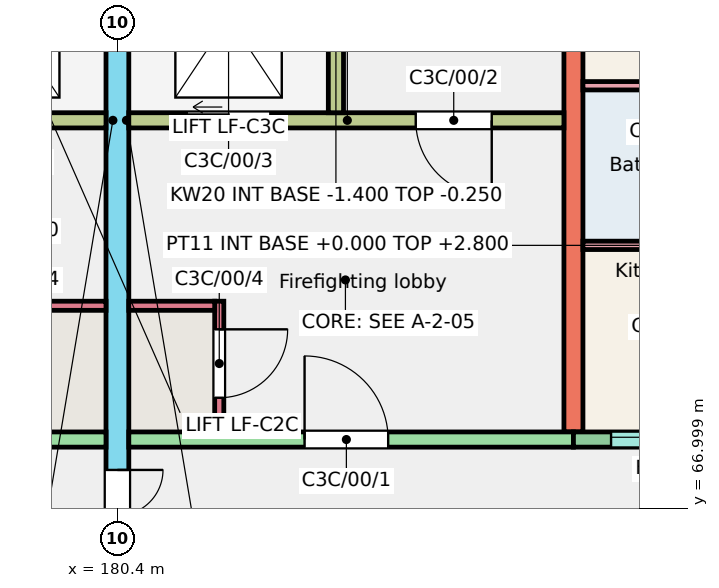
"""IFC4 building model, lengths in metres.
Left out: names, types, materials, properties, quantities, classifications, styles, units other than length and angle.
Written with IfcOpenShell. Run it as: python <this file> out.ifc"""

import sys

from ifc_helpers import new_model, si_unit, direction, frame, frame_2d, origin, place, context, subcontext, project, spatial, rectangle, extrude, element, fill, save


model = new_model("IFC4")
c1 = context("Model", 3, precision=1e-05, world=origin(), true_north=direction((0.0, 1.0)))
c2 = subcontext(c1, "Body", "Model", "MODEL_VIEW")
j1 = project(units=[si_unit("LENGTHUNIT", "METRE"), si_unit("PLANEANGLEUNIT", "RADIAN")], contexts=[c1])
p1 = place(None, origin())
s1 = spatial("IfcSite", under=j1, at=p1, CompositionType="ELEMENT")
p2 = place(p1, origin())
s2 = spatial("IfcBuilding", under=s1, at=p2, CompositionType="ELEMENT")
p3 = place(p2, origin())
s3 = spatial("IfcBuildingStorey", under=s2, at=p3, CompositionType="ELEMENT", Elevation=0.0)
p4 = place(p3, frame((180.4, 66.0, -0.25), z_axis=(0.0, 0.0, 1.0), x_axis=(0.0, 1.0, 0.0)))
e1 = element("IfcWall", 1, at=p4, inside=s3, PredefinedType="SHEAR", context=c2, shape_type="SweptSolid", body=[
    extrude(rectangle(XDim=11.0, YDim=0.3, at=frame_2d((5.5, 0.0))), origin(), (0.0, 0.0, 1.0), 3.25),
])
p5 = place(p4, frame((0.3, 0.0, 0.25)))
e2 = element("IfcOpeningElement", 2, at=p5, cuts=e1, PredefinedType="OPENING", context=c2, shape_type="SweptSolid", body=[
    extrude(rectangle(XDim=1.2, YDim=2.1, at=frame_2d((0.6, 1.05))), frame((0.0, 0.16, 0.0), z_axis=(0.0, -1.0, 0.0), x_axis=(1.0, 0.0, 0.0)), (0.0, 0.0, 1.0), 0.32),
])
p6 = place(p3, frame((186.4, 68.0, -0.25), z_axis=(0.0, 0.0, 1.0), x_axis=(0.0, 1.0, 0.0)))
e3 = element("IfcWall", 3, at=p6, inside=s3, PredefinedType="SHEAR", context=c2, shape_type="SweptSolid", body=[
    extrude(rectangle(XDim=9.0, YDim=0.25, at=frame_2d((4.5, 0.0))), origin(), (0.0, 0.0, 1.0), 3.25),
])
p7 = place(p3, frame((174.4, 67.9, -0.25), z_axis=(0.0, 0.0, 1.0), x_axis=(1.0, 0.0, 0.0)))
e4 = element("IfcWall", 4, at=p7, inside=s3, PredefinedType="SHEAR", context=c2, shape_type="SweptSolid", body=[
    extrude(rectangle(XDim=5.85, YDim=0.2, at=frame_2d((2.925, 0.0))), origin(), (0.0, 0.0, 1.0), 3.25),
])
p8 = place(p7, frame((2.438, 0.0, 0.25)))
e5 = element("IfcOpeningElement", 5, at=p8, cuts=e4, PredefinedType="OPENING", context=c2, shape_type="SweptSolid", body=[
    extrude(rectangle(XDim=1.1, YDim=2.1, at=frame_2d((0.55, 1.05))), frame((0.0, 0.11, 0.0), z_axis=(0.0, -1.0, 0.0), x_axis=(1.0, 0.0, 0.0)), (0.0, 0.0, 1.0), 0.22),
])
p9 = place(p3, frame((174.525, 72.1, -0.25), z_axis=(0.0, 0.0, 1.0), x_axis=(1.0, 0.0, 0.0)))
e6 = element("IfcWall", 6, at=p9, inside=s3, PredefinedType="SHEAR", context=c2, shape_type="SweptSolid", body=[
    extrude(rectangle(XDim=5.725, YDim=0.2, at=frame_2d((2.863, 0.0))), origin(), (0.0, 0.0, 1.0), 3.25),
])
p10 = place(p9, frame((0.95, 0.0, 0.25)))
e7 = element("IfcOpeningElement", 7, at=p10, cuts=e6, PredefinedType="OPENING", context=c2, shape_type="SweptSolid", body=[
    extrude(rectangle(XDim=1.0, YDim=2.1, at=frame_2d((0.5, 1.05))), frame((0.0, 0.11, 0.0), z_axis=(0.0, -1.0, 0.0), x_axis=(1.0, 0.0, 0.0)), (0.0, 0.0, 1.0), 0.22),
])
p11 = place(p9, frame((3.863, 0.0, 0.25)))
e8 = element("IfcOpeningElement", 8, at=p11, cuts=e6, PredefinedType="OPENING", context=c2, shape_type="SweptSolid", body=[
    extrude(rectangle(XDim=1.1, YDim=2.1, at=frame_2d((0.55, 1.05))), frame((0.0, 0.11, 0.0), z_axis=(0.0, -1.0, 0.0), x_axis=(1.0, 0.0, 0.0)), (0.0, 0.0, 1.0), 0.22),
])
p12 = place(p3, frame((179.12, 69.66, -0.25), z_axis=(0.0, 0.0, 1.0), x_axis=(1.0, 0.0, 0.0)))
e9 = element("IfcWall", 9, at=p12, inside=s3, PredefinedType="SHEAR", context=c2, shape_type="SweptSolid", body=[
    extrude(rectangle(XDim=1.13, YDim=0.12, at=frame_2d((0.565, 0.0))), origin(), (0.0, 0.0, 1.0), 3.25),
])
p13 = place(p3, frame((180.55, 67.9, -0.25), z_axis=(0.0, 0.0, 1.0), x_axis=(1.0, 0.0, 0.0)))
e10 = element("IfcWall", 10, at=p13, inside=s3, PredefinedType="SHEAR", context=c2, shape_type="SweptSolid", body=[
    extrude(rectangle(XDim=5.85, YDim=0.2, at=frame_2d((2.925, 0.0))), origin(), (0.0, 0.0, 1.0), 3.25),
])
p14 = place(p13, frame((2.312, 0.0, 0.25)))
e11 = element("IfcOpeningElement", 11, at=p14, cuts=e10, PredefinedType="OPENING", context=c2, shape_type="SweptSolid", body=[
    extrude(rectangle(XDim=1.1, YDim=2.1, at=frame_2d((0.55, 1.05))), frame((0.0, 0.11, 0.0), z_axis=(0.0, -1.0, 0.0), x_axis=(1.0, 0.0, 0.0)), (0.0, 0.0, 1.0), 0.22),
])
p15 = place(p3, frame((180.55, 72.1, -0.25), z_axis=(0.0, 0.0, 1.0), x_axis=(1.0, 0.0, 0.0)))
e12 = element("IfcWall", 12, at=p15, inside=s3, PredefinedType="SHEAR", context=c2, shape_type="SweptSolid", body=[
    extrude(rectangle(XDim=5.725, YDim=0.2, at=frame_2d((2.862, 0.0))), origin(), (0.0, 0.0, 1.0), 3.25),
])
p16 = place(p15, frame((3.775, 0.0, 0.25)))
e13 = element("IfcOpeningElement", 13, at=p16, cuts=e12, PredefinedType="OPENING", context=c2, shape_type="SweptSolid", body=[
    extrude(rectangle(XDim=1.0, YDim=2.1, at=frame_2d((0.5, 1.05))), frame((0.0, 0.11, 0.0), z_axis=(0.0, -1.0, 0.0), x_axis=(1.0, 0.0, 0.0)), (0.0, 0.0, 1.0), 0.22),
])
p17 = place(p15, frame((0.762, 0.0, 0.25)))
e14 = element("IfcOpeningElement", 14, at=p17, cuts=e12, PredefinedType="OPENING", context=c2, shape_type="SweptSolid", body=[
    extrude(rectangle(XDim=1.1, YDim=2.1, at=frame_2d((0.55, 1.05))), frame((0.0, 0.11, 0.0), z_axis=(0.0, -1.0, 0.0), x_axis=(1.0, 0.0, 0.0)), (0.0, 0.0, 1.0), 0.22),
])
p18 = place(p3, frame((183.275, 72.2, -0.25), z_axis=(0.0, 0.0, 1.0), x_axis=(0.0, 1.0, 0.0)))
e15 = element("IfcWall", 15, at=p18, inside=s3, PredefinedType="SHEAR", context=c2, shape_type="SweptSolid", body=[
    extrude(rectangle(XDim=4.8, YDim=0.2, at=frame_2d((2.4, 0.0))), origin(), (0.0, 0.0, 1.0), 3.25),
])
p19 = place(p3, frame((181.74, 68.0, -0.25), z_axis=(0.0, 0.0, 1.0), x_axis=(0.0, 1.0, 0.0)))
e16 = element("IfcWall", 16, at=p19, inside=s3, PredefinedType="SHEAR", context=c2, shape_type="SweptSolid", body=[
    extrude(rectangle(XDim=1.72, YDim=0.12, at=frame_2d((0.86, 0.0))), origin(), (0.0, 0.0, 1.0), 3.25),
])
p20 = place(p19, frame((0.45, 0.0, 0.25)))
e17 = element("IfcOpeningElement", 17, at=p20, cuts=e16, PredefinedType="OPENING", context=c2, shape_type="SweptSolid", body=[
    extrude(rectangle(XDim=0.9, YDim=2.1, at=frame_2d((0.45, 1.05))), frame((0.0, 0.07, 0.0), z_axis=(0.0, -1.0, 0.0), x_axis=(1.0, 0.0, 0.0)), (0.0, 0.0, 1.0), 0.14),
])
p21 = place(p3, frame((180.55, 69.66, -0.25), z_axis=(0.0, 0.0, 1.0), x_axis=(1.0, 0.0, 0.0)))
e18 = element("IfcWall", 18, at=p21, inside=s3, PredefinedType="SHEAR", context=c2, shape_type="SweptSolid", body=[
    extrude(rectangle(XDim=1.13, YDim=0.12, at=frame_2d((0.565, 0.0))), origin(), (0.0, 0.0, 1.0), 3.25),
])
p22 = place(p3, frame((186.4, 67.9, -0.25), z_axis=(0.0, 0.0, 1.0), x_axis=(1.0, 0.0, 0.0)))
e19 = element("IfcWall", 19, at=p22, inside=s3, PredefinedType="SOLIDWALL", context=c2, shape_type="SweptSolid", body=[
    extrude(rectangle(XDim=3.6, YDim=0.2, at=frame_2d((1.8, 0.0))), origin(), (0.0, 0.0, 1.0), 3.25),
])
p23 = place(p22, frame((0.495, 0.0, 1.35)))
e20 = element("IfcOpeningElement", 20, at=p23, cuts=e19, PredefinedType="OPENING", context=c2, shape_type="SweptSolid", body=[
    extrude(rectangle(XDim=1.2, YDim=1.3, at=frame_2d((0.6, 0.65))), frame((0.0, 0.11, 0.0), z_axis=(0.0, -1.0, 0.0), x_axis=(1.0, 0.0, 0.0)), (0.0, 0.0, 1.0), 0.22),
])
p24 = place(p22, frame((2.325, 0.0, 0.25)))
e21 = element("IfcOpeningElement", 21, at=p24, cuts=e19, PredefinedType="OPENING", context=c2, shape_type="SweptSolid", body=[
    extrude(rectangle(XDim=1.0, YDim=2.1, at=frame_2d((0.5, 1.05))), frame((0.0, 0.11, 0.0), z_axis=(0.0, -1.0, 0.0), x_axis=(1.0, 0.0, 0.0)), (0.0, 0.0, 1.0), 0.22),
])
p25 = place(p3, frame((177.425, 72.1, -1.4), z_axis=(0.0, 0.0, 1.0), x_axis=(1.0, 0.0, 0.0)))
e22 = element("IfcWall", 22, at=p25, inside=s3, PredefinedType="SHEAR", context=c2, shape_type="SweptSolid", body=[
    extrude(rectangle(XDim=2.975, YDim=0.2, at=frame_2d((1.487, 0.0))), origin(), (0.0, 0.0, 1.0), 1.15),
])
p26 = place(p3, frame((180.325, 72.2, -1.4), z_axis=(0.0, 0.0, 1.0), x_axis=(0.0, 1.0, 0.0)))
e23 = element("IfcWall", 23, at=p26, inside=s3, PredefinedType="SHEAR", context=c2, shape_type="SweptSolid", body=[
    extrude(rectangle(XDim=3.0, YDim=0.15, at=frame_2d((1.5, 0.0))), origin(), (0.0, 0.0, 1.0), 1.15),
])
p27 = place(p3, frame((180.4, 72.1, -1.4), z_axis=(0.0, 0.0, 1.0), x_axis=(1.0, 0.0, 0.0)))
e24 = element("IfcWall", 24, at=p27, inside=s3, PredefinedType="SHEAR", context=c2, shape_type="SweptSolid", body=[
    extrude(rectangle(XDim=2.975, YDim=0.2, at=frame_2d((1.488, 0.0))), origin(), (0.0, 0.0, 1.0), 1.15),
])
p28 = place(p3, frame((183.275, 72.2, -1.4), z_axis=(0.0, 0.0, 1.0), x_axis=(0.0, 1.0, 0.0)))
e25 = element("IfcWall", 25, at=p28, inside=s3, PredefinedType="SHEAR", context=c2, shape_type="SweptSolid", body=[
    extrude(rectangle(XDim=3.0, YDim=0.2, at=frame_2d((1.5, 0.0))), origin(), (0.0, 0.0, 1.0), 1.15),
])
p29 = place(p3, frame((180.475, 72.2, -1.4), z_axis=(0.0, 0.0, 1.0), x_axis=(0.0, 1.0, 0.0)))
e26 = element("IfcWall", 26, at=p29, inside=s3, PredefinedType="SHEAR", context=c2, shape_type="SweptSolid", body=[
    extrude(rectangle(XDim=3.0, YDim=0.15, at=frame_2d((1.5, 0.0))), origin(), (0.0, 0.0, 1.0), 1.15),
])
p30 = place(p3, frame((186.525, 70.455, 0.0), z_axis=(0.0, 0.0, 1.0), x_axis=(1.0, 0.0, 0.0)))
e27 = element("IfcWall", 27, at=p30, inside=s3, PredefinedType="PARTITIONING", context=c2, shape_type="SweptSolid", body=[
    extrude(rectangle(XDim=1.94, YDim=0.11, at=frame_2d((0.97, 0.0))), origin(), (0.0, 0.0, 1.0), 2.8),
])
p31 = place(p3, frame((186.525, 72.555, 0.0), z_axis=(0.0, 0.0, 1.0), x_axis=(1.0, 0.0, 0.0)))
e28 = element("IfcWall", 28, at=p31, inside=s3, PredefinedType="PARTITIONING", context=c2, shape_type="SweptSolid", body=[
    extrude(rectangle(XDim=3.35, YDim=0.11, at=frame_2d((1.675, 0.0))), origin(), (0.0, 0.0, 1.0), 2.8),
])
p32 = place(p31, frame((2.25, 0.0, 0.0)))
e29 = element("IfcOpeningElement", 29, at=p32, cuts=e28, PredefinedType="OPENING", context=c2, shape_type="SweptSolid", body=[
    extrude(rectangle(XDim=0.9, YDim=2.1, at=frame_2d((0.45, 1.05))), frame((0.0, 0.065, 0.0), z_axis=(0.0, -1.0, 0.0), x_axis=(1.0, 0.0, 0.0)), (0.0, 0.0, 1.0), 0.13),
])
p33 = place(p23, origin())
e30 = element("IfcWindow", 30, at=p33, inside=s3, PartitioningType="SINGLE_PANEL", PredefinedType="WINDOW", context=c2, shape_type="SweptSolid", body=[
    extrude(rectangle(XDim=1.2, YDim=1.3, at=frame_2d((0.6, 0.65))), frame((0.0, 0.06, 0.0), z_axis=(0.0, -1.0, 0.0), x_axis=(1.0, 0.0, 0.0)), (0.0, 0.0, 1.0), 0.06),
])
fill(e20, e30)
p34 = place(p14, origin())
e31 = element("IfcDoor", 31, at=p34, inside=s3, OperationType="SINGLE_SWING_LEFT", PredefinedType="DOOR", context=c2, shape_type="SweptSolid", body=[
    extrude(rectangle(XDim=1.1, YDim=2.1, at=frame_2d((0.55, 1.05))), frame((0.0, 0.025, 0.0), z_axis=(0.0, -1.0, 0.0), x_axis=(1.0, 0.0, 0.0)), (0.0, 0.0, 1.0), 0.05),
])
fill(e11, e31)
p35 = place(p16, origin())
e32 = element("IfcDoor", 32, at=p35, inside=s3, OperationType="SINGLE_SWING_RIGHT", PredefinedType="DOOR", context=c2, shape_type="SweptSolid", body=[
    extrude(rectangle(XDim=1.0, YDim=2.1, at=frame_2d((0.5, 1.05))), frame((0.0, 0.025, 0.0), z_axis=(0.0, -1.0, 0.0), x_axis=(1.0, 0.0, 0.0)), (0.0, 0.0, 1.0), 0.05),
])
fill(e13, e32)
p36 = place(p17, origin())
e33 = element("IfcDoor", 33, at=p36, inside=s3, OperationType="DOUBLE_DOOR_SLIDING", PredefinedType="DOOR", context=c2, shape_type="SweptSolid", body=[
    extrude(rectangle(XDim=1.1, YDim=2.1, at=frame_2d((0.55, 1.05))), frame((0.0, 0.025, 0.0), z_axis=(0.0, -1.0, 0.0), x_axis=(1.0, 0.0, 0.0)), (0.0, 0.0, 1.0), 0.05),
])
fill(e14, e33)
p37 = place(p20, origin())
e34 = element("IfcDoor", 34, at=p37, inside=s3, OperationType="SINGLE_SWING_RIGHT", PredefinedType="DOOR", context=c2, shape_type="SweptSolid", body=[
    extrude(rectangle(XDim=0.9, YDim=2.1, at=frame_2d((0.45, 1.05))), frame((0.0, 0.025, 0.0), z_axis=(0.0, -1.0, 0.0), x_axis=(1.0, 0.0, 0.0)), (0.0, 0.0, 1.0), 0.05),
])
fill(e17, e34)
p38 = place(p5, origin())
e35 = element("IfcDoor", 35, at=p38, inside=s3, OperationType="DOUBLE_DOOR_SINGLE_SWING", PredefinedType="DOOR", context=c2, shape_type="SweptSolid", body=[
    extrude(rectangle(XDim=1.2, YDim=2.1, at=frame_2d((0.6, 1.05))), frame((0.0, 0.025, 0.0), z_axis=(0.0, -1.0, 0.0), x_axis=(1.0, 0.0, 0.0)), (0.0, 0.0, 1.0), 0.05),
])
fill(e2, e35)
save(model, sys.argv[1])
